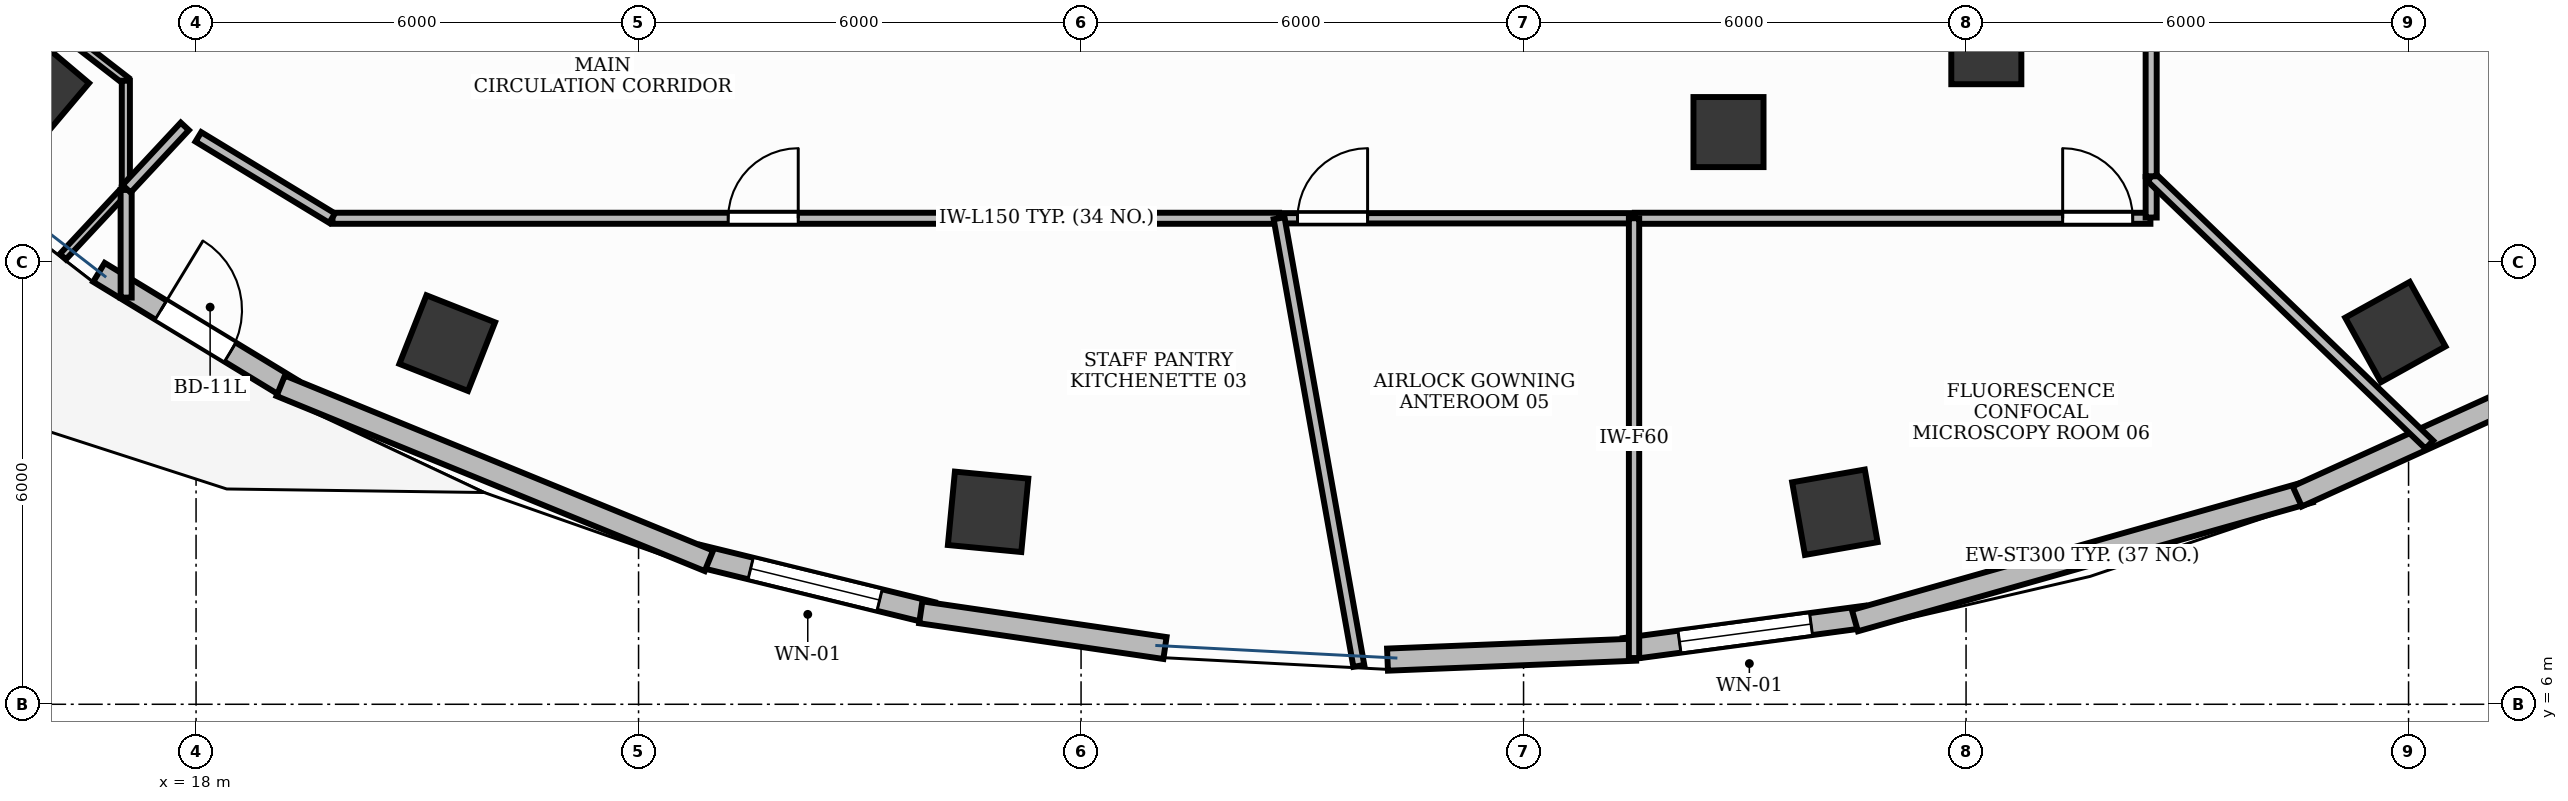
"""IFC4 building model, lengths in metres.
Left out: names, types, materials, properties, quantities, classifications, styles, units other than length and angle.
Written with IfcOpenShell. Run it as: python <this file> out.ifc"""

import sys

from ifc_helpers import new_model, si_unit, direction, frame, frame_2d, origin, origin_2d, place, context, subcontext, project, spatial, rectangle, extrude, element, fill, save


model = new_model("IFC4")
c1 = context("Model", 3, precision=1e-05, world=origin(), true_north=direction((0.0, 1.0)))
c2 = subcontext(c1, "Body", "Model", "MODEL_VIEW")
j1 = project(units=[si_unit("LENGTHUNIT", "METRE"), si_unit("PLANEANGLEUNIT", "RADIAN")], contexts=[c1])
p1 = place(None, origin())
s1 = spatial("IfcSite", under=j1, at=p1, CompositionType="ELEMENT")
p2 = place(p1, origin())
s2 = spatial("IfcBuilding", under=s1, at=p2, CompositionType="ELEMENT")
p3 = place(p2, frame((0.0, 0.0, 154.2)))
s3 = spatial("IfcBuildingStorey", under=s2, at=p3, CompositionType="ELEMENT", Elevation=154.2)
for number, where, z_axis, x_axis in (
    (1, (15.844, 14.363, -0.0), (0.0, 0.0, 1.0), (-0.764, 0.645, 0.0)),
    (2, (21.406, 10.897, -0.0), (0.0, 0.0, 1.0), (-0.93, 0.367, 0.0)),
    (3, (28.74, 8.61, -0.0), (0.0, 0.0, 1.0), (-0.995, 0.095, 0.0)),
    (4, (40.221, 8.604, -0.0), (0.0, 0.0, 1.0), (0.985, 0.173, 0.0)),
):
    element("IfcColumn", number, at=place(p3, frame(where, z_axis=z_axis, x_axis=x_axis)), inside=s3, PredefinedType="COLUMN", context=c2, shape_type="SweptSolid", body=[
        extrude(rectangle(XDim=1.0, YDim=1.0, at=origin_2d()), origin(), (0.0, 0.0, 1.0), 3.901),
    ])
p4 = place(p3, frame((38.779, 13.759, -0.0), z_axis=(0.0, 0.0, 1.0), x_axis=(1.0, 0.0, 0.0)))
e5 = element("IfcColumn", 5, at=p4, inside=s3, PredefinedType="COLUMN", context=c2, shape_type="SweptSolid", body=[
    extrude(rectangle(XDim=0.95, YDim=0.95, at=origin_2d()), origin(), (0.0, 0.0, 1.0), 3.901),
])
p5 = place(p3, frame((47.821, 11.047, -0.0), z_axis=(0.0, 0.0, 1.0), x_axis=(0.874535078577, 0.484962262797, 0.0)))
e6 = element("IfcColumn", 6, at=p5, inside=s3, PredefinedType="COLUMN", context=c2, shape_type="SweptSolid", body=[
    extrude(rectangle(XDim=1.0, YDim=1.0, at=origin_2d()), origin(), (0.0, 0.0, 1.0), 3.901),
])
p6 = place(p3, frame((42.275, 14.883, -0.0), z_axis=(0.0, 0.0, 1.0), x_axis=(1.0, 0.0, 0.0)))
e7 = element("IfcColumn", 7, at=p6, inside=s3, PredefinedType="COLUMN", context=c2, shape_type="SweptSolid", body=[
    extrude(rectangle(XDim=0.95, YDim=0.95, at=origin_2d()), origin(), (0.0, 0.0, 1.0), 3.901),
])
p7 = place(p3, frame((16.683, 11.856, 0.0), z_axis=(0.0, 0.0, 1.0), x_axis=(0.85455658592, -0.519358297769, 0.0)))
e8 = element("IfcWall", 8, at=p7, inside=s3, PredefinedType="STANDARD", context=c2, shape_type="SweptSolid", body=[
    extrude(rectangle(XDim=3.066, YDim=0.3, at=frame_2d((1.533, 0.0))), origin(), (0.0, 0.0, 1.0), 3.9),
])
p8 = place(p7, frame((0.983, 0.0, 0.0)))
e9 = element("IfcOpeningElement", 9, at=p8, cuts=e8, PredefinedType="OPENING", context=c2, shape_type="SweptSolid", body=[
    extrude(rectangle(XDim=1.1, YDim=2.15, at=frame_2d((0.55, 1.075))), frame((0.0, 0.165, 0.0), z_axis=(0.0, -1.0, 0.0), x_axis=(1.0, 0.0, 0.0)), (0.0, 0.0, 1.0), 0.33),
])
p9 = place(p3, frame((24.807, 8.016, 0.0), z_axis=(0.0, 0.0, 1.0), x_axis=(0.971312804689, -0.237805457142, 0.0)))
e10 = element("IfcWall", 10, at=p9, inside=s3, PredefinedType="STANDARD", context=c2, shape_type="SweptSolid", body=[
    extrude(rectangle(XDim=3.269, YDim=0.3, at=frame_2d((1.634, 0.0))), origin(), (0.0, 0.0, 1.0), 3.9),
])
p10 = place(p9, frame((0.734, 0.0, 0.9)))
e11 = element("IfcOpeningElement", 11, at=p10, cuts=e10, PredefinedType="OPENING", context=c2, shape_type="SweptSolid", body=[
    extrude(rectangle(XDim=1.8, YDim=2.1, at=frame_2d((0.9, 1.05))), frame((0.0, 0.165, 0.0), z_axis=(0.0, -1.0, 0.0), x_axis=(1.0, 0.0, 0.0)), (0.0, 0.0, 1.0), 0.33),
])
p11 = place(p3, frame((37.365, 6.748, 0.0), z_axis=(0.0, 0.0, 1.0), x_axis=(0.991139436205, 0.132825517122, 0.0)))
e12 = element("IfcWall", 12, at=p11, inside=s3, PredefinedType="STANDARD", context=c2, shape_type="SweptSolid", body=[
    extrude(rectangle(XDim=3.31, YDim=0.3, at=frame_2d((1.655, 0.0))), origin(), (0.0, 0.0, 1.0), 3.9),
])
p12 = place(p11, frame((0.755, 0.0, 0.9)))
e13 = element("IfcOpeningElement", 13, at=p12, cuts=e12, PredefinedType="OPENING", context=c2, shape_type="SweptSolid", body=[
    extrude(rectangle(XDim=1.8, YDim=2.1, at=frame_2d((0.9, 1.05))), frame((0.0, 0.165, 0.0), z_axis=(0.0, -1.0, 0.0), x_axis=(1.0, 0.0, 0.0)), (0.0, 0.0, 1.0), 0.33),
])
p13 = place(p3, frame((19.148, 10.318, 0.0), z_axis=(0.0, 0.0, 1.0), x_axis=(0.925664098805, -0.378346370648, 0.0)))
e14 = element("IfcWall", 14, at=p13, inside=s3, PredefinedType="STANDARD", context=c2, shape_type="SweptSolid", body=[
    extrude(rectangle(XDim=6.272, YDim=0.3, at=frame_2d((3.136, 0.0))), origin(), (0.0, 0.0, 1.0), 3.47),
])
p14 = place(p3, frame((27.826, 7.247, 0.0), z_axis=(0.0, 0.0, 1.0), x_axis=(0.98945927954, -0.144811374319, 0.0)))
e15 = element("IfcWall", 15, at=p14, inside=s3, PredefinedType="STANDARD", context=c2, shape_type="SweptSolid", body=[
    extrude(rectangle(XDim=3.346, YDim=0.3, at=frame_2d((1.673, 0.0))), origin(), (0.0, 0.0, 1.0), 3.47),
])
p15 = place(p3, frame((34.155, 6.605, 0.0), z_axis=(0.0, 0.0, 1.0), x_axis=(0.999190386434, 0.040231475948, 0.0)))
e16 = element("IfcWall", 16, at=p15, inside=s3, PredefinedType="STANDARD", context=c2, shape_type="SweptSolid", body=[
    extrude(rectangle(XDim=3.368, YDim=0.3, at=frame_2d((1.684, 0.0))), origin(), (0.0, 0.0, 1.0), 3.9),
])
p16 = place(p3, frame((40.493, 7.134, 0.0), z_axis=(0.0, 0.0, 1.0), x_axis=(0.962163849422, 0.272471515694, 0.0)))
e17 = element("IfcWall", 17, at=p16, inside=s3, PredefinedType="STANDARD", context=c2, shape_type="SweptSolid", body=[
    extrude(rectangle(XDim=6.409, YDim=0.3, at=frame_2d((3.205, 0.0))), origin(), (0.0, 0.0, 1.0), 3.9),
])
p17 = place(p3, frame((46.49, 8.818, 0.0), z_axis=(0.0, 0.0, 1.0), x_axis=(0.910633193525, 0.413215666268, 0.0)))
e18 = element("IfcWall", 18, at=p17, inside=s3, PredefinedType="STANDARD", context=c2, shape_type="SweptSolid", body=[
    extrude(rectangle(XDim=3.195, YDim=0.3, at=frame_2d((1.598, 0.0))), origin(), (0.0, 0.0, 1.0), 3.9),
])
p18 = place(p3, frame((19.85, 12.59, 0.0), z_axis=(0.0, 0.0, 1.0), x_axis=(1.0, 0.0, 0.0)))
e19 = element("IfcWall", 19, at=p18, inside=s3, PredefinedType="PARTITIONING", context=c2, shape_type="SweptSolid", body=[
    extrude(rectangle(XDim=12.835, YDim=0.15, at=frame_2d((6.418, 0.0))), origin(), (0.0, 0.0, 1.0), 2.91),
])
p19 = place(p18, frame((5.365, 0.0, 0.0)))
e20 = element("IfcOpeningElement", 20, at=p19, cuts=e19, PredefinedType="OPENING", context=c2, shape_type="SweptSolid", body=[
    extrude(rectangle(XDim=0.95, YDim=2.15, at=frame_2d((0.475, 1.075))), frame((0.0, 0.09, 0.0), z_axis=(0.0, -1.0, 0.0), x_axis=(1.0, 0.0, 0.0)), (0.0, 0.0, 1.0), 0.18),
])
p20 = place(p3, frame((32.695, 12.59, 0.0), z_axis=(0.0, 0.0, 1.0), x_axis=(1.0, 0.0, 0.0)))
e21 = element("IfcWall", 21, at=p20, inside=s3, PredefinedType="PARTITIONING", context=c2, shape_type="SweptSolid", body=[
    extrude(rectangle(XDim=4.803, YDim=0.14, at=frame_2d((2.401, 0.0))), origin(), (0.0, 0.0, 1.0), 2.91),
])
p21 = place(p20, frame((0.24, 0.0, 0.0)))
e22 = element("IfcOpeningElement", 22, at=p21, cuts=e21, PredefinedType="OPENING", context=c2, shape_type="SweptSolid", body=[
    extrude(rectangle(XDim=0.95, YDim=2.15, at=frame_2d((0.475, 1.075))), frame((0.0, 0.085, 0.0), z_axis=(0.0, -1.0, 0.0), x_axis=(1.0, 0.0, 0.0)), (0.0, 0.0, 1.0), 0.17),
])
p22 = place(p3, frame((37.508, 12.59, 0.0), z_axis=(0.0, 0.0, 1.0), x_axis=(1.0, 0.0, 0.0)))
e23 = element("IfcWall", 23, at=p22, inside=s3, PredefinedType="PARTITIONING", context=c2, shape_type="SweptSolid", body=[
    extrude(rectangle(XDim=6.992, YDim=0.15, at=frame_2d((3.496, 0.0))), origin(), (0.0, 0.0, 1.0), 2.91),
])
p23 = place(p22, frame((5.802, 0.0, 0.0)))
e24 = element("IfcOpeningElement", 24, at=p23, cuts=e23, PredefinedType="OPENING", context=c2, shape_type="SweptSolid", body=[
    extrude(rectangle(XDim=0.95, YDim=2.15, at=frame_2d((0.475, 1.075))), frame((0.0, 0.09, 0.0), z_axis=(0.0, -1.0, 0.0), x_axis=(1.0, 0.0, 0.0)), (0.0, 0.0, 1.0), 0.18),
])
p24 = place(p3, frame((15.995, 15.271, 0.0), z_axis=(0.0, 0.0, 1.0), x_axis=(0.790603531082, -0.612328389543, 0.0)))
e25 = element("IfcWall", 25, at=p24, inside=s3, PredefinedType="MOVABLE", context=c2, shape_type="SweptSolid", body=[
    extrude(rectangle(XDim=1.333, YDim=0.11, at=frame_2d((0.666, 0.0))), origin(), (0.0, 0.0, 1.0), 2.91),
])
p25 = place(p3, frame((17.048, 14.455, 0.0), z_axis=(0.0, 0.0, 1.0), x_axis=(0.0, -1.0, 0.0)))
e26 = element("IfcWall", 26, at=p25, inside=s3, PredefinedType="MOVABLE", context=c2, shape_type="SweptSolid", body=[
    extrude(rectangle(XDim=1.47, YDim=0.11, at=frame_2d((0.735, 0.0))), origin(), (0.0, 0.0, 1.0), 2.91),
])
p26 = place(p3, frame((17.048, 12.984, 0.0), z_axis=(0.0, 0.0, 1.0), x_axis=(-0.681894093702, -0.731450917679, 0.0)))
e27 = element("IfcWall", 27, at=p26, inside=s3, PredefinedType="MOVABLE", context=c2, shape_type="SweptSolid", body=[
    extrude(rectangle(XDim=1.251, YDim=0.11, at=frame_2d((0.625, 0.0))), origin(), (0.0, 0.0, 1.0), 2.91),
])
p27 = place(p3, frame((18.031, 13.694, 0.0), z_axis=(0.0, 0.0, 1.0), x_axis=(0.85454497186, -0.51937740716, 0.0)))
e28 = element("IfcWall", 28, at=p27, inside=s3, PredefinedType="PARTITIONING", context=c2, shape_type="SweptSolid", body=[
    extrude(rectangle(XDim=2.122, YDim=0.15, at=frame_2d((1.061, 0.0))), origin(), (0.0, 0.0, 1.0), 2.91),
])
p28 = place(p3, frame((32.685, 12.59, 0.0), z_axis=(0.0, 0.0, 1.0), x_axis=(0.175350659772, -0.984506041687, 0.0)))
e29 = element("IfcWall", 29, at=p28, inside=s3, PredefinedType="PARTITIONING", context=c2, shape_type="SweptSolid", body=[
    extrude(rectangle(XDim=6.165, YDim=0.15, at=frame_2d((3.083, 0.0))), origin(), (0.0, 0.0, 1.0), 2.91),
])
p29 = place(p3, frame((17.052, 11.514, 0.0), z_axis=(0.0, 0.0, 1.0), x_axis=(0.0, 1.0, 0.0)))
e30 = element("IfcWall", 30, at=p29, inside=s3, PredefinedType="PARTITIONING", context=c2, shape_type="SweptSolid", body=[
    extrude(rectangle(XDim=1.46, YDim=0.15, at=frame_2d((0.73, 0.0))), origin(), (0.0, 0.0, 1.0), 2.91),
])
p30 = place(p3, frame((17.058, 12.99, 0.0), z_axis=(0.0, 0.0, 1.0), x_axis=(0.681994997266, 0.731356837464, 0.0)))
e31 = element("IfcWall", 31, at=p30, inside=s3, PredefinedType="PARTITIONING", context=c2, shape_type="SweptSolid", body=[
    extrude(rectangle(XDim=1.157, YDim=0.15, at=frame_2d((0.579, 0.0))), origin(), (0.0, 0.0, 1.0), 2.91),
])
p31 = place(p3, frame((37.498, 12.59, 0.0), z_axis=(0.0, 0.0, 1.0), x_axis=(0.0, -1.0, 0.0)))
e32 = element("IfcWall", 32, at=p31, inside=s3, PredefinedType="PARTITIONING", context=c2, shape_type="SweptSolid", body=[
    extrude(rectangle(XDim=5.963, YDim=0.14, at=frame_2d((2.981, 0.0))), origin(), (0.0, 0.0, 1.0), 2.91),
])
p32 = place(p3, frame((44.51, 12.6, 0.0), z_axis=(0.0, 0.0, 1.0), x_axis=(0.0, 1.0, 0.0)))
e33 = element("IfcWall", 33, at=p32, inside=s3, PredefinedType="PARTITIONING", context=c2, shape_type="SweptSolid", body=[
    extrude(rectangle(XDim=0.55, YDim=0.15, at=frame_2d((0.275, 0.0))), origin(), (0.0, 0.0, 1.0), 2.91),
])
p33 = place(p3, frame((44.51, 13.15, 0.0), z_axis=(0.0, 0.0, 1.0), x_axis=(0.720549773239, -0.69340321912, 0.0)))
e34 = element("IfcWall", 34, at=p33, inside=s3, PredefinedType="PARTITIONING", context=c2, shape_type="SweptSolid", body=[
    extrude(rectangle(XDim=5.234, YDim=0.15, at=frame_2d((2.617, 0.0))), origin(), (0.0, 0.0, 1.0), 2.91),
])
p34 = place(p3, frame((44.51, 13.16, 0.0), z_axis=(0.0, 0.0, 1.0), x_axis=(0.0, 1.0, 0.0)))
e35 = element("IfcWall", 35, at=p34, inside=s3, PredefinedType="PARTITIONING", context=c2, shape_type="SweptSolid", body=[
    extrude(rectangle(XDim=3.24, YDim=0.15, at=frame_2d((1.62, 0.0))), origin(), (0.0, 0.0, 1.0), 2.91),
])
p35 = place(p8, origin())
e36 = element("IfcDoor", 36, at=p35, inside=s3, OperationType="SINGLE_SWING_LEFT", PredefinedType="DOOR", context=c2, shape_type="SweptSolid", body=[
    extrude(rectangle(XDim=1.1, YDim=2.15, at=frame_2d((0.55, 1.075))), frame((0.0, 0.025, 0.0), z_axis=(0.0, -1.0, 0.0), x_axis=(1.0, 0.0, 0.0)), (0.0, 0.0, 1.0), 0.05),
])
fill(e9, e36)
p36 = place(p10, origin())
e37 = element("IfcWindow", 37, at=p36, inside=s3, PartitioningType="SINGLE_PANEL", PredefinedType="WINDOW", context=c2, shape_type="SweptSolid", body=[
    extrude(rectangle(XDim=1.8, YDim=2.1, at=frame_2d((0.9, 1.05))), frame((0.0, 0.03, 0.0), z_axis=(0.0, -1.0, 0.0), x_axis=(1.0, 0.0, 0.0)), (0.0, 0.0, 1.0), 0.06),
])
fill(e11, e37)
p37 = place(p12, origin())
e38 = element("IfcWindow", 38, at=p37, inside=s3, PartitioningType="SINGLE_PANEL", PredefinedType="WINDOW", context=c2, shape_type="SweptSolid", body=[
    extrude(rectangle(XDim=1.8, YDim=2.1, at=frame_2d((0.9, 1.05))), frame((0.0, 0.03, 0.0), z_axis=(0.0, -1.0, 0.0), x_axis=(1.0, 0.0, 0.0)), (0.0, 0.0, 1.0), 0.06),
])
fill(e13, e38)
p38 = place(p19, origin())
e39 = element("IfcDoor", 39, at=p38, inside=s3, OperationType="SINGLE_SWING_RIGHT", PredefinedType="DOOR", context=c2, shape_type="SweptSolid", body=[
    extrude(rectangle(XDim=0.95, YDim=2.15, at=frame_2d((0.475, 1.075))), frame((0.0, 0.025, 0.0), z_axis=(0.0, -1.0, 0.0), x_axis=(1.0, 0.0, 0.0)), (0.0, 0.0, 1.0), 0.05),
])
fill(e20, e39)
p39 = place(p21, origin())
e40 = element("IfcDoor", 40, at=p39, inside=s3, OperationType="SINGLE_SWING_RIGHT", PredefinedType="DOOR", context=c2, shape_type="SweptSolid", body=[
    extrude(rectangle(XDim=0.95, YDim=2.15, at=frame_2d((0.475, 1.075))), frame((0.0, 0.025, 0.0), z_axis=(0.0, -1.0, 0.0), x_axis=(1.0, 0.0, 0.0)), (0.0, 0.0, 1.0), 0.05),
])
fill(e22, e40)
p40 = place(p23, origin())
e41 = element("IfcDoor", 41, at=p40, inside=s3, OperationType="SINGLE_SWING_LEFT", PredefinedType="DOOR", context=c2, shape_type="SweptSolid", body=[
    extrude(rectangle(XDim=0.95, YDim=2.15, at=frame_2d((0.475, 1.075))), frame((0.0, 0.025, 0.0), z_axis=(0.0, -1.0, 0.0), x_axis=(1.0, 0.0, 0.0)), (0.0, 0.0, 1.0), 0.05),
])
fill(e24, e41)
save(model, sys.argv[1])
